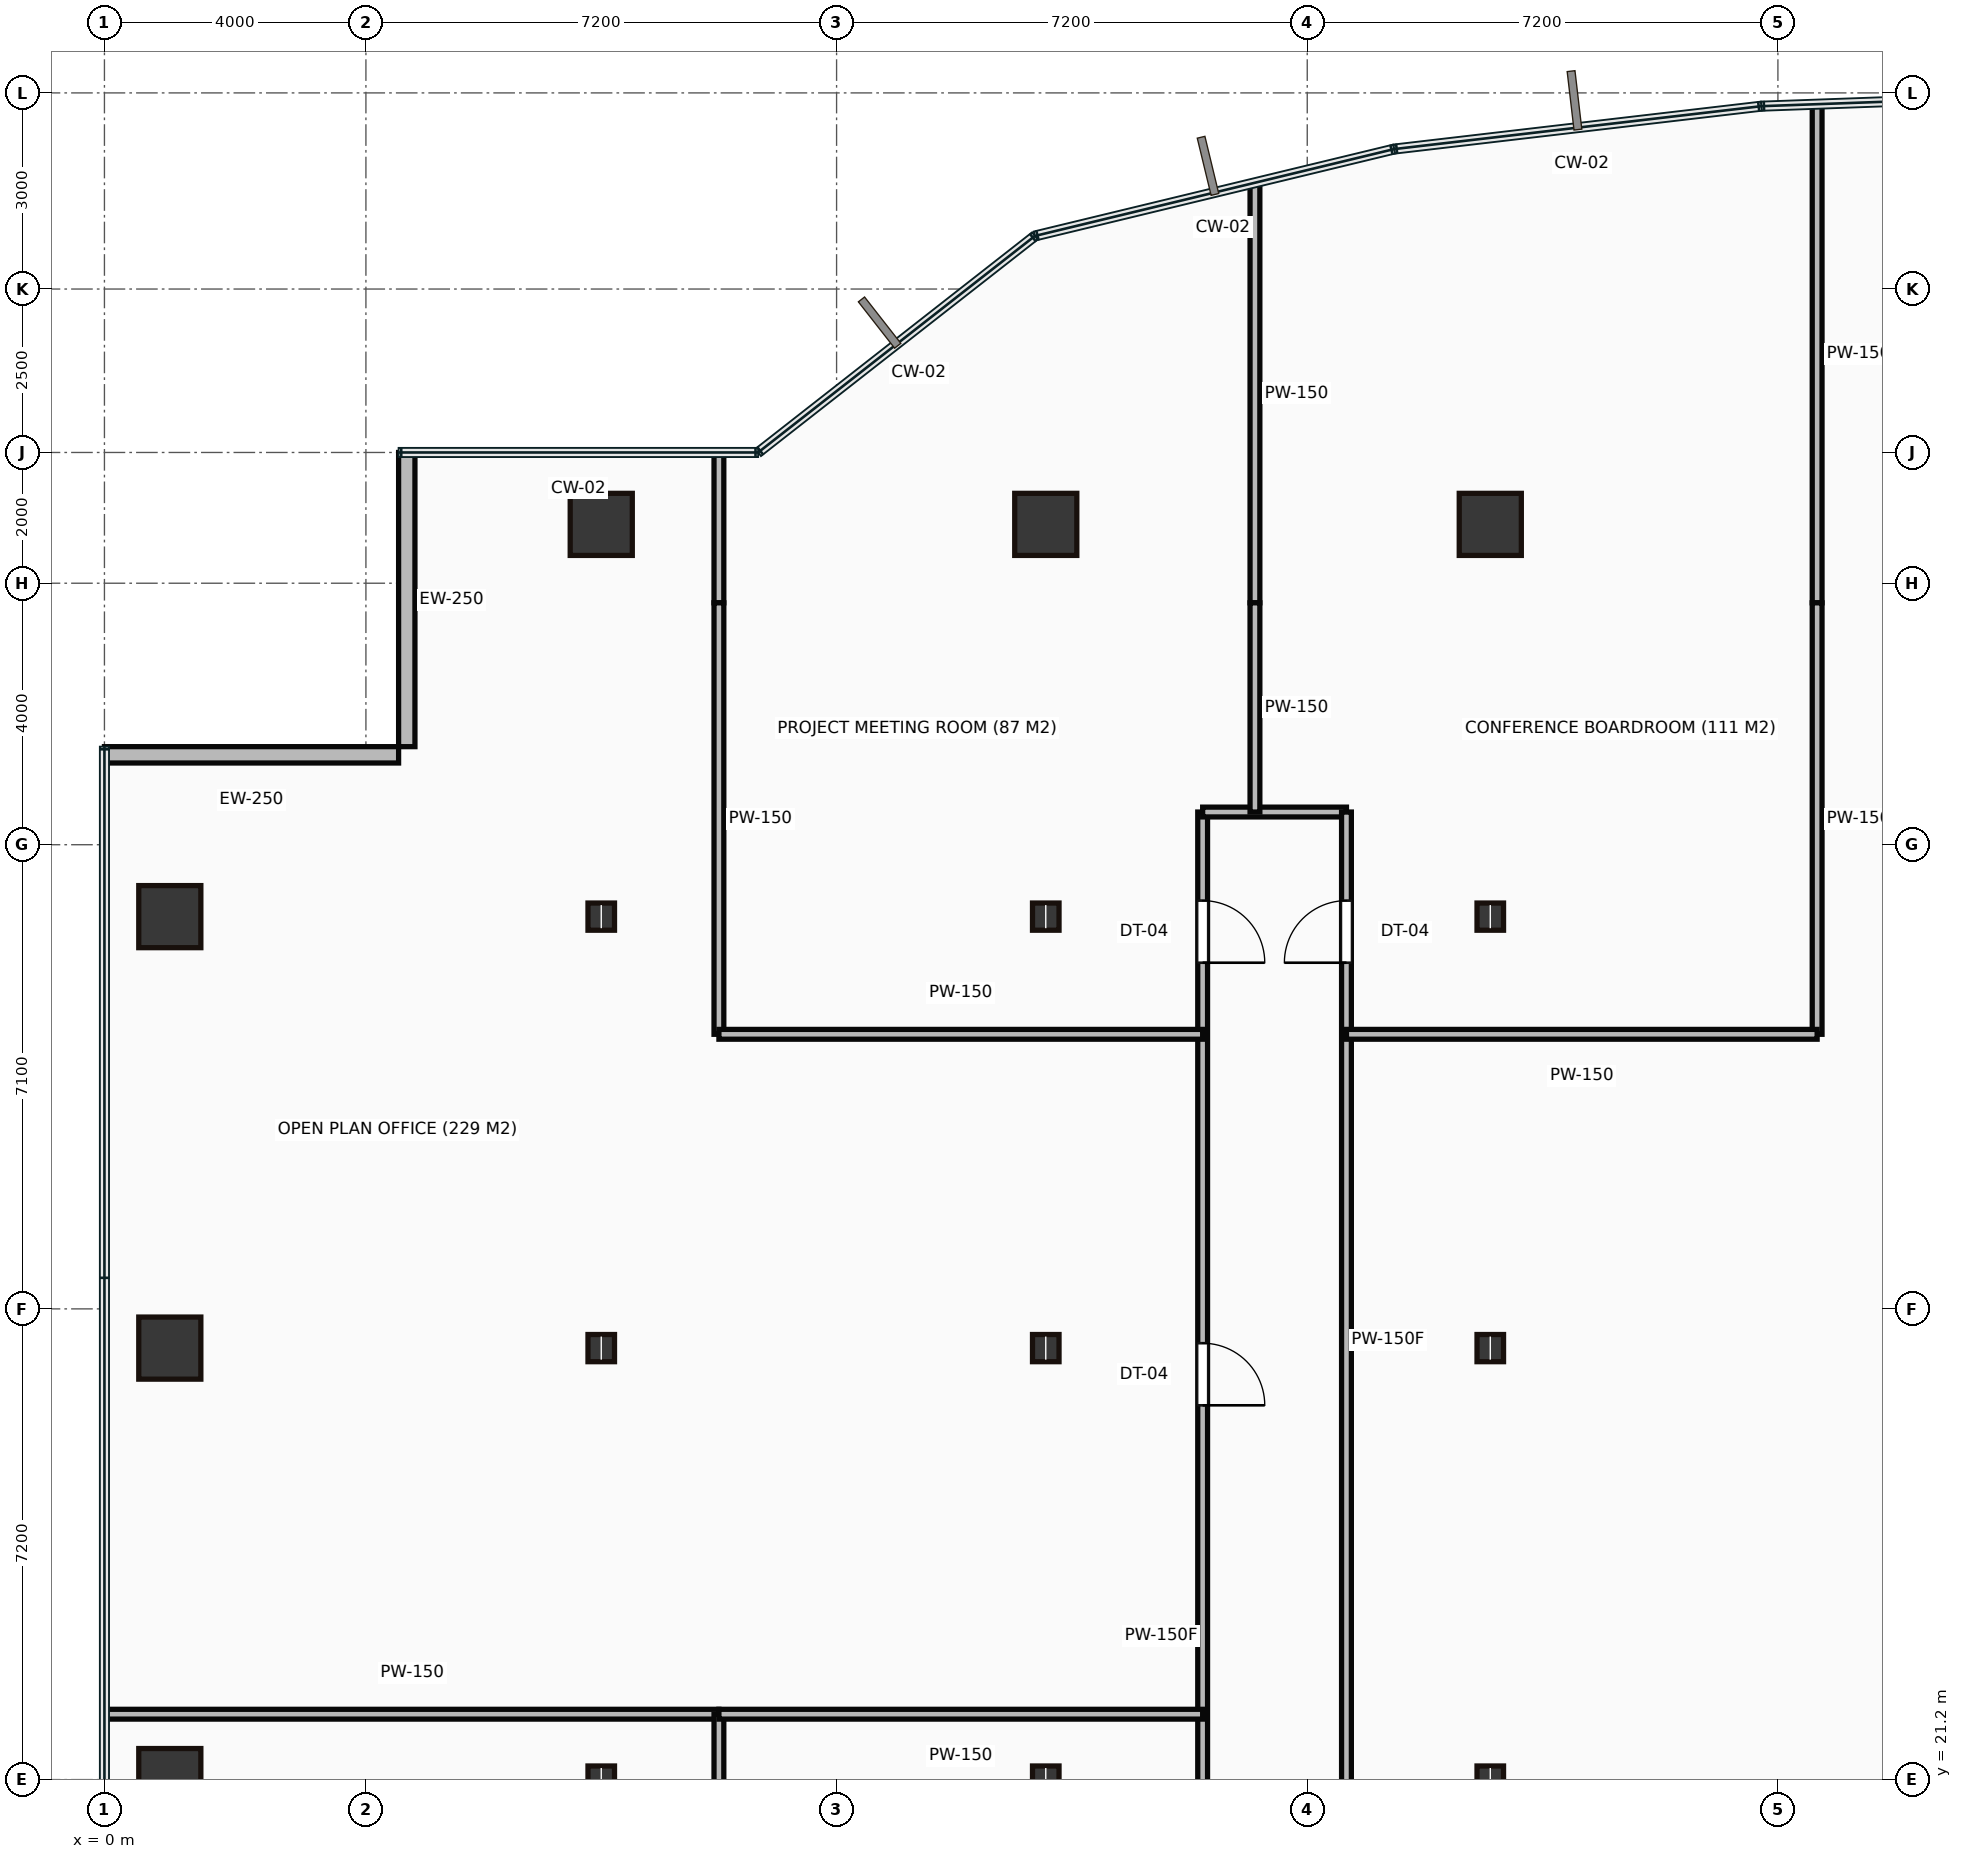
"""IFC4 building model, lengths in metres.
Left out: names, types, materials, properties, quantities, classifications, styles, units other than length and angle.
Written with IfcOpenShell. Run it as: python <this file> out.ifc"""

import sys

from ifc_helpers import new_model, si_unit, direction, frame, frame_2d, origin, origin_2d, place, context, subcontext, project, spatial, rectangle, hollow_rectangle, i_section, extrude, source, transform, mapped, element, fill, save


model = new_model("IFC4")
c1 = context("Model", 3, precision=1e-05, world=origin(), true_north=direction((0.0, 1.0)))
c2 = subcontext(c1, "Body", "Model", "MODEL_VIEW")
j1 = project(units=[si_unit("LENGTHUNIT", "METRE"), si_unit("PLANEANGLEUNIT", "RADIAN")], contexts=[c1])
p1 = place(None, origin())
s1 = spatial("IfcSite", under=j1, at=p1, CompositionType="ELEMENT")
p2 = place(p1, origin())
s2 = spatial("IfcBuilding", under=s1, at=p2, CompositionType="ELEMENT")
p3 = place(p2, frame((0.0, 0.0, 39.8)))
s3 = spatial("IfcBuildingStorey", under=s2, at=p3, CompositionType="ELEMENT", Elevation=39.8)
m1 = source(origin(), c2, "Body", "SweptSolid", [
    extrude(hollow_rectangle(XDim=0.95, YDim=0.95, WallThickness=0.045, at=origin_2d()), origin(), (0.0, 0.0, 1.0), 3.65),
])
for number, where, z_axis, x_axis in (
    (1, (1.0, 21.2, 0.0), (0.0, 0.0, 1.0), (1.0, 0.0, 0.0)),
    (2, (1.0, 27.8, 0.0), (0.0, 0.0, 1.0), (1.0, 0.0, 0.0)),
    (3, (1.0, 34.4, 0.0), (0.0, 0.0, 1.0), (1.0, 0.0, 0.0)),
):
    element("IfcColumn", number, at=place(p3, frame(where, z_axis=z_axis, x_axis=x_axis)), inside=s3, PredefinedType="COLUMN", context=c2, shape_type="MappedRepresentation", body=[
        mapped(m1, transform((0.0, 0.0, 0.0))),
    ])
m2 = source(origin(), c2, "Body", "SweptSolid", [
    extrude(i_section(OverallWidth=0.406, OverallDepth=0.416, WebThickness=0.03, FlangeThickness=0.048, at=origin_2d()), origin(), (0.0, 0.0, 1.0), 3.65),
])
for number, where, z_axis, x_axis in (
    (4, (7.6, 21.2, 0.0), (0.0, 0.0, 1.0), (1.0, 0.0, 0.0)),
    (5, (7.6, 27.8, 0.0), (0.0, 0.0, 1.0), (1.0, 0.0, 0.0)),
    (6, (7.6, 34.4, 0.0), (0.0, 0.0, 1.0), (1.0, 0.0, 0.0)),
):
    element("IfcColumn", number, at=place(p3, frame(where, z_axis=z_axis, x_axis=x_axis)), inside=s3, PredefinedType="COLUMN", context=c2, shape_type="MappedRepresentation", body=[
        mapped(m2, transform((0.0, 0.0, 0.0))),
    ])
p4 = place(p3, frame((7.6, 40.4, 0.0), z_axis=(0.0, 0.0, 1.0), x_axis=(1.0, 0.0, 0.0)))
e7 = element("IfcColumn", 7, at=p4, inside=s3, PredefinedType="COLUMN", context=c2, shape_type="MappedRepresentation", body=[
    mapped(m1, transform((0.0, 0.0, 0.0))),
])
for number, where, z_axis, x_axis in (
    (8, (14.4, 21.2, 0.0), (0.0, 0.0, 1.0), (1.0, 0.0, 0.0)),
    (9, (14.4, 27.8, 0.0), (0.0, 0.0, 1.0), (1.0, 0.0, 0.0)),
    (10, (14.4, 34.4, 0.0), (0.0, 0.0, 1.0), (1.0, 0.0, 0.0)),
):
    element("IfcColumn", number, at=place(p3, frame(where, z_axis=z_axis, x_axis=x_axis)), inside=s3, PredefinedType="COLUMN", context=c2, shape_type="MappedRepresentation", body=[
        mapped(m2, transform((0.0, 0.0, 0.0))),
    ])
p5 = place(p3, frame((14.4, 40.4, 0.0), z_axis=(0.0, 0.0, 1.0), x_axis=(1.0, 0.0, 0.0)))
e11 = element("IfcColumn", 11, at=p5, inside=s3, PredefinedType="COLUMN", context=c2, shape_type="MappedRepresentation", body=[
    mapped(m1, transform((0.0, 0.0, 0.0))),
])
for number, where, z_axis, x_axis in (
    (12, (21.2, 21.2, 0.0), (0.0, 0.0, 1.0), (1.0, 0.0, 0.0)),
    (13, (21.2, 27.8, 0.0), (0.0, 0.0, 1.0), (1.0, 0.0, 0.0)),
    (14, (21.2, 34.4, 0.0), (0.0, 0.0, 1.0), (1.0, 0.0, 0.0)),
):
    element("IfcColumn", number, at=place(p3, frame(where, z_axis=z_axis, x_axis=x_axis)), inside=s3, PredefinedType="COLUMN", context=c2, shape_type="MappedRepresentation", body=[
        mapped(m2, transform((0.0, 0.0, 0.0))),
    ])
p6 = place(p3, frame((21.2, 40.4, 0.0), z_axis=(0.0, 0.0, 1.0), x_axis=(1.0, 0.0, 0.0)))
e15 = element("IfcColumn", 15, at=p6, inside=s3, PredefinedType="COLUMN", context=c2, shape_type="MappedRepresentation", body=[
    mapped(m1, transform((0.0, 0.0, 0.0))),
])
m3 = source(origin(), c2, "Body", "SweptSolid", [
    extrude(rectangle(XDim=4.5, YDim=0.25, at=frame_2d((2.25, 0.0))), origin(), (0.0, 0.0, 1.0), 3.4),
])
for number, where, z_axis, x_axis in (
    (16, (4.625, 41.5, 0.0), (0.0, 0.0, 1.0), (0.0, -1.0, 0.0)),
    (17, (4.5, 36.875, 0.0), (0.0, 0.0, 1.0), (-1.0, 0.0, 0.0)),
):
    element("IfcWall", number, at=place(p3, frame(where, z_axis=z_axis, x_axis=x_axis)), inside=s3, PredefinedType="STANDARD", context=c2, shape_type="MappedRepresentation", body=[
        mapped(m3, transform((0.0, 0.0, 0.0))),
    ])
m4 = source(origin(), c2, "Body", "SweptSolid", [
    extrude(rectangle(XDim=16.15, YDim=0.15, at=frame_2d((8.075, 0.0))), origin(), (0.0, 0.0, 1.0), 3.4),
])
p7 = place(p3, frame((16.8, 19.85, 0.0), z_axis=(0.0, 0.0, 1.0), x_axis=(0.0, 1.0, 0.0)))
e18 = element("IfcWall", 18, at=p7, inside=s3, PredefinedType="PARTITIONING", context=c2, shape_type="MappedRepresentation", body=[
    mapped(m4, transform((0.0, 0.0, 0.0))),
])
p8 = place(p7, frame((7.075, 0.0, 0.0)))
e19 = element("IfcOpeningElement", 19, at=p8, cuts=e18, PredefinedType="OPENING", context=c2, shape_type="SweptSolid", body=[
    extrude(rectangle(XDim=0.95, YDim=2.15, at=frame_2d((0.475, 1.075))), frame((0.0, 0.085, 0.0), z_axis=(0.0, -1.0, 0.0), x_axis=(1.0, 0.0, 0.0)), (0.0, 0.0, 1.0), 0.17),
])
p9 = place(p7, frame((13.845, 0.0, 0.0)))
e20 = element("IfcOpeningElement", 20, at=p9, cuts=e18, PredefinedType="OPENING", context=c2, shape_type="SweptSolid", body=[
    extrude(rectangle(XDim=0.95, YDim=2.15, at=frame_2d((0.475, 1.075))), frame((0.0, 0.085, 0.0), z_axis=(0.0, -1.0, 0.0), x_axis=(1.0, 0.0, 0.0)), (0.0, 0.0, 1.0), 0.17),
])
m5 = source(origin(), c2, "Body", "SweptSolid", [
    extrude(rectangle(XDim=2.2, YDim=0.15, at=frame_2d((1.1, 0.0))), origin(), (0.0, 0.0, 1.0), 3.4),
])
p10 = place(p3, frame((16.8, 36.0, 0.0), z_axis=(0.0, 0.0, 1.0), x_axis=(1.0, 0.0, 0.0)))
e21 = element("IfcWall", 21, at=p10, inside=s3, PredefinedType="PARTITIONING", context=c2, shape_type="MappedRepresentation", body=[
    mapped(m5, transform((0.0, 0.0, 0.0))),
])
p11 = place(p3, frame((19.0, 36.0, 0.0), z_axis=(0.0, 0.0, 1.0), x_axis=(0.0, -1.0, 0.0)))
e22 = element("IfcWall", 22, at=p11, inside=s3, PredefinedType="PARTITIONING", context=c2, shape_type="MappedRepresentation", body=[
    mapped(m4, transform((0.0, 0.0, 0.0))),
])
p12 = place(p11, frame((1.355, 0.0, 0.0)))
e23 = element("IfcOpeningElement", 23, at=p12, cuts=e22, PredefinedType="OPENING", context=c2, shape_type="SweptSolid", body=[
    extrude(rectangle(XDim=0.95, YDim=2.15, at=frame_2d((0.475, 1.075))), frame((0.0, 0.085, 0.0), z_axis=(0.0, -1.0, 0.0), x_axis=(1.0, 0.0, 0.0)), (0.0, 0.0, 1.0), 0.17),
])
m6 = source(origin(), c2, "Body", "SweptSolid", [
    extrude(rectangle(XDim=9.38, YDim=0.15, at=frame_2d((4.69, 0.0))), origin(), (0.0, 0.0, 1.0), 3.4),
])
p13 = place(p3, frame((0.02, 22.2, 0.0), z_axis=(0.0, 0.0, 1.0), x_axis=(1.0, 0.0, 0.0)))
e24 = element("IfcWall", 24, at=p13, inside=s3, PredefinedType="PARTITIONING", context=c2, shape_type="MappedRepresentation", body=[
    mapped(m6, transform((0.0, 0.0, 0.0))),
])
m7 = source(origin(), c2, "Body", "SweptSolid", [
    extrude(rectangle(XDim=5.95, YDim=0.15, at=frame_2d((2.975, 0.0))), origin(), (0.0, 0.0, 1.0), 3.4),
])
p14 = place(p3, frame((9.4, 22.2, 0.0), z_axis=(0.0, 0.0, 1.0), x_axis=(0.0, -1.0, 0.0)))
e25 = element("IfcWall", 25, at=p14, inside=s3, PredefinedType="PARTITIONING", context=c2, shape_type="MappedRepresentation", body=[
    mapped(m7, transform((0.0, 0.0, 0.0))),
])
m8 = source(origin(), c2, "Body", "SweptSolid", [
    extrude(rectangle(XDim=7.4, YDim=0.15, at=frame_2d((3.7, 0.0))), origin(), (0.0, 0.0, 1.0), 3.4),
])
p15 = place(p3, frame((16.8, 22.2, 0.0), z_axis=(0.0, 0.0, 1.0), x_axis=(-1.0, 0.0, 0.0)))
e26 = element("IfcWall", 26, at=p15, inside=s3, PredefinedType="PARTITIONING", context=c2, shape_type="MappedRepresentation", body=[
    mapped(m8, transform((0.0, 0.0, 0.0))),
])
m9 = source(origin(), c2, "Body", "SweptSolid", [
    extrude(rectangle(XDim=2.28, YDim=0.15, at=frame_2d((1.14, 0.0))), origin(), (0.0, 0.0, 1.0), 3.4),
])
p16 = place(p3, frame((9.4, 41.48, 0.0), z_axis=(0.0, 0.0, 1.0), x_axis=(0.0, -1.0, 0.0)))
e27 = element("IfcWall", 27, at=p16, inside=s3, PredefinedType="PARTITIONING", context=c2, shape_type="MappedRepresentation", body=[
    mapped(m9, transform((0.0, 0.0, 0.0))),
])
m10 = source(origin(), c2, "Body", "SweptSolid", [
    extrude(rectangle(XDim=6.6, YDim=0.15, at=frame_2d((3.3, 0.0))), origin(), (0.0, 0.0, 1.0), 3.4),
])
p17 = place(p3, frame((9.4, 39.2, 0.0), z_axis=(0.0, 0.0, 1.0), x_axis=(0.0, -1.0, 0.0)))
e28 = element("IfcWall", 28, at=p17, inside=s3, PredefinedType="PARTITIONING", context=c2, shape_type="MappedRepresentation", body=[
    mapped(m10, transform((0.0, 0.0, 0.0))),
])
p18 = place(p3, frame((9.4, 32.6, 0.0), z_axis=(0.0, 0.0, 1.0), x_axis=(1.0, 0.0, 0.0)))
e29 = element("IfcWall", 29, at=p18, inside=s3, PredefinedType="PARTITIONING", context=c2, shape_type="MappedRepresentation", body=[
    mapped(m8, transform((0.0, 0.0, 0.0))),
])
m11 = source(origin(), c2, "Body", "SweptSolid", [
    extrude(rectangle(XDim=6.405, YDim=0.15, at=frame_2d((3.203, 0.0))), origin(), (0.0, 0.0, 1.0), 3.4),
])
p19 = place(p3, frame((17.6, 45.605, 0.0), z_axis=(0.0, 0.0, 1.0), x_axis=(0.0, -1.0, 0.0)))
e30 = element("IfcWall", 30, at=p19, inside=s3, PredefinedType="PARTITIONING", context=c2, shape_type="MappedRepresentation", body=[
    mapped(m11, transform((0.0, 0.0, 0.0))),
])
m12 = source(origin(), c2, "Body", "SweptSolid", [
    extrude(rectangle(XDim=3.2, YDim=0.15, at=frame_2d((1.6, 0.0))), origin(), (0.0, 0.0, 1.0), 3.4),
])
p20 = place(p3, frame((17.6, 39.2, 0.0), z_axis=(0.0, 0.0, 1.0), x_axis=(0.0, -1.0, 0.0)))
e31 = element("IfcWall", 31, at=p20, inside=s3, PredefinedType="PARTITIONING", context=c2, shape_type="MappedRepresentation", body=[
    mapped(m12, transform((0.0, 0.0, 0.0))),
])
m13 = source(origin(), c2, "Body", "SweptSolid", [
    extrude(rectangle(XDim=7.608, YDim=0.15, at=frame_2d((3.804, 0.0))), origin(), (0.0, 0.0, 1.0), 3.4),
])
p21 = place(p3, frame((26.2, 46.808, 0.0), z_axis=(0.0, 0.0, 1.0), x_axis=(0.0, -1.0, 0.0)))
e32 = element("IfcWall", 32, at=p21, inside=s3, PredefinedType="PARTITIONING", context=c2, shape_type="MappedRepresentation", body=[
    mapped(m13, transform((0.0, 0.0, 0.0))),
])
p22 = place(p3, frame((26.2, 39.2, 0.0), z_axis=(0.0, 0.0, 1.0), x_axis=(0.0, -1.0, 0.0)))
e33 = element("IfcWall", 33, at=p22, inside=s3, PredefinedType="PARTITIONING", context=c2, shape_type="MappedRepresentation", body=[
    mapped(m10, transform((0.0, 0.0, 0.0))),
])
m14 = source(origin(), c2, "Body", "SweptSolid", [
    extrude(rectangle(XDim=7.2, YDim=0.15, at=frame_2d((3.6, 0.0))), origin(), (0.0, 0.0, 1.0), 3.4),
])
p23 = place(p3, frame((26.2, 32.6, 0.0), z_axis=(0.0, 0.0, 1.0), x_axis=(-1.0, 0.0, 0.0)))
e34 = element("IfcWall", 34, at=p23, inside=s3, PredefinedType="PARTITIONING", context=c2, shape_type="MappedRepresentation", body=[
    mapped(m14, transform((0.0, 0.0, 0.0))),
])
m15 = source(origin(), c2, "Body", "SweptSolid", [
    extrude(rectangle(XDim=0.95, YDim=2.15, at=frame_2d((0.475, 1.075))), frame((0.0, 0.025, 0.0), z_axis=(0.0, -1.0, 0.0), x_axis=(1.0, 0.0, 0.0)), (0.0, 0.0, 1.0), 0.05),
])
p24 = place(p8, origin())
e35 = element("IfcDoor", 35, at=p24, inside=s3, OperationType="SINGLE_SWING_LEFT", PredefinedType="DOOR", context=c2, shape_type="MappedRepresentation", body=[
    mapped(m15, transform((0.0, 0.0, 0.0))),
])
fill(e19, e35)
p25 = place(p9, origin())
e36 = element("IfcDoor", 36, at=p25, inside=s3, OperationType="SINGLE_SWING_LEFT", PredefinedType="DOOR", context=c2, shape_type="MappedRepresentation", body=[
    mapped(m15, transform((0.0, 0.0, 0.0))),
])
fill(e20, e36)
p26 = place(p12, origin())
e37 = element("IfcDoor", 37, at=p26, inside=s3, OperationType="SINGLE_SWING_RIGHT", PredefinedType="DOOR", context=c2, shape_type="MappedRepresentation", body=[
    mapped(m15, transform((0.0, 0.0, 0.0))),
])
fill(e23, e37)
save(model, sys.argv[1])
